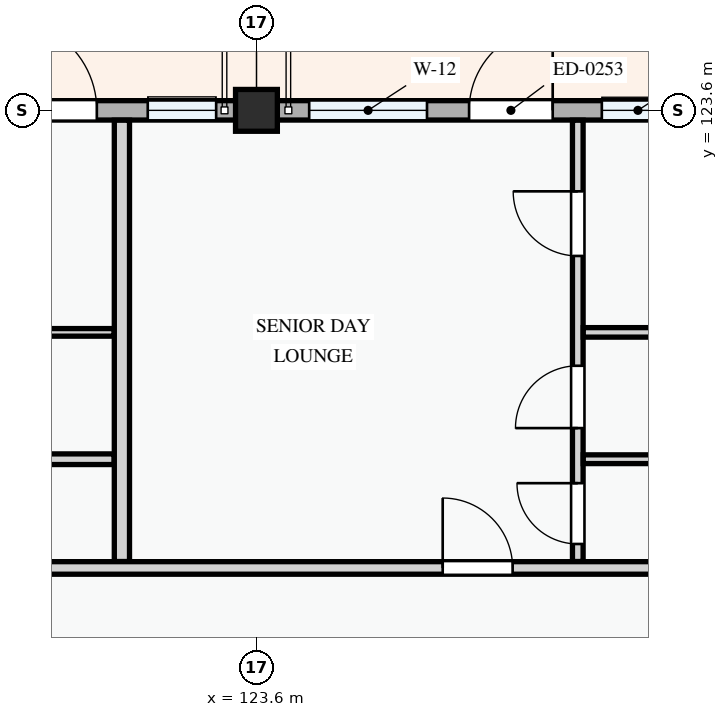
"""IFC4 building model, lengths in metres.
Left out: names, types, materials, properties, quantities, classifications, styles, units other than length and angle.
Written with IfcOpenShell. Run it as: python <this file> out.ifc"""

import sys

from ifc_helpers import new_model, si_unit, direction, frame, frame_2d, origin, origin_2d, place, context, subcontext, project, spatial, rectangle, extrude, element, fill, save


model = new_model("IFC4")
c1 = context("Model", 3, precision=1e-05, world=origin(), true_north=direction((0.0, 1.0)))
c2 = subcontext(c1, "Body", "Model", "MODEL_VIEW")
j1 = project(units=[si_unit("LENGTHUNIT", "METRE"), si_unit("PLANEANGLEUNIT", "RADIAN")], contexts=[c1])
p1 = place(None, origin())
s1 = spatial("IfcSite", under=j1, at=p1, CompositionType="ELEMENT")
p2 = place(p1, origin())
s2 = spatial("IfcBuilding", under=s1, at=p2, CompositionType="ELEMENT")
p3 = place(p2, frame((0.0, 0.0, 34.5)))
s3 = spatial("IfcBuildingStorey", under=s2, at=p3, CompositionType="ELEMENT", Elevation=34.5)
p4 = place(p3, frame((123.6, 123.6, 0.0), z_axis=(0.0, 0.0, 1.0), x_axis=(1.0, 0.0, 0.0)))
e1 = element("IfcColumn", 1, at=p4, inside=s3, PredefinedType="COLUMN", context=c2, shape_type="SweptSolid", body=[
    extrude(rectangle(XDim=0.55, YDim=0.55, at=origin_2d()), origin(), (0.0, 0.0, 1.0), 3.3),
])
p5 = place(p3, frame((129.6, 123.6, 0.0), z_axis=(0.0, 0.0, 1.0), x_axis=(-1.0, 0.0, 0.0)))
e2 = element("IfcWall", 2, at=p5, inside=s3, PredefinedType="STANDARD", context=c2, shape_type="SweptSolid", body=[
    extrude(rectangle(XDim=6.0, YDim=0.255, at=frame_2d((3.0, 0.0))), origin(), (0.0, 0.0, 1.0), 2.445),
])
p6 = place(p5, frame((2.102, 0.0, 0.0)))
e3 = element("IfcOpeningElement", 3, at=p6, cuts=e2, PredefinedType="OPENING", context=c2, shape_type="SweptSolid", body=[
    extrude(rectangle(XDim=1.1, YDim=2.15, at=frame_2d((0.55, 1.075))), frame((0.0, 0.137, 0.0), z_axis=(0.0, -1.0, 0.0), x_axis=(1.0, 0.0, 0.0)), (0.0, 0.0, 1.0), 0.275),
])
p7 = place(p5, frame((0.506, 0.0, 0.78)))
e4 = element("IfcOpeningElement", 4, at=p7, cuts=e2, PredefinedType="OPENING", context=c2, shape_type="SweptSolid", body=[
    extrude(rectangle(XDim=0.95, YDim=1.15, at=frame_2d((0.475, 0.575))), frame((0.0, 0.137, 0.0), z_axis=(0.0, -1.0, 0.0), x_axis=(1.0, 0.0, 0.0)), (0.0, 0.0, 1.0), 0.275),
])
p8 = place(p5, frame((3.756, 0.0, 0.78)))
e5 = element("IfcOpeningElement", 5, at=p8, cuts=e2, PredefinedType="OPENING", context=c2, shape_type="SweptSolid", body=[
    extrude(rectangle(XDim=1.55, YDim=1.4, at=frame_2d((0.775, 0.7))), frame((0.0, 0.137, 0.0), z_axis=(0.0, -1.0, 0.0), x_axis=(1.0, 0.0, 0.0)), (0.0, 0.0, 1.0), 0.275),
])
p9 = place(p3, frame((123.6, 123.6, 0.0), z_axis=(0.0, 0.0, 1.0), x_axis=(-1.0, 0.0, 0.0)))
e6 = element("IfcWall", 6, at=p9, inside=s3, PredefinedType="STANDARD", context=c2, shape_type="SweptSolid", body=[
    extrude(rectangle(XDim=8.4, YDim=0.255, at=frame_2d((4.2, 0.0))), origin(), (0.0, 0.0, 1.0), 2.345),
])
p10 = place(p9, frame((2.1, 0.0, 0.0)))
e7 = element("IfcOpeningElement", 7, at=p10, cuts=e6, PredefinedType="OPENING", context=c2, shape_type="SweptSolid", body=[
    extrude(rectangle(XDim=1.2, YDim=2.15, at=frame_2d((0.6, 1.075))), frame((0.0, 0.137, 0.0), z_axis=(0.0, -1.0, 0.0), x_axis=(1.0, 0.0, 0.0)), (0.0, 0.0, 1.0), 0.275),
])
p11 = place(p9, frame((0.53, 0.0, 0.78)))
e8 = element("IfcOpeningElement", 8, at=p11, cuts=e6, PredefinedType="OPENING", context=c2, shape_type="SweptSolid", body=[
    extrude(rectangle(XDim=0.9, YDim=1.2, at=frame_2d((0.45, 0.6))), frame((0.0, 0.137, 0.0), z_axis=(0.0, -1.0, 0.0), x_axis=(1.0, 0.0, 0.0)), (0.0, 0.0, 1.0), 0.275),
])
p12 = place(p9, frame((4.503, 0.0, 0.78)))
e9 = element("IfcOpeningElement", 9, at=p12, cuts=e6, PredefinedType="OPENING", context=c2, shape_type="SweptSolid", body=[
    extrude(rectangle(XDim=0.95, YDim=1.15, at=frame_2d((0.475, 0.575))), frame((0.0, 0.137, 0.0), z_axis=(0.0, -1.0, 0.0), x_axis=(1.0, 0.0, 0.0)), (0.0, 0.0, 1.0), 0.275),
])
p13 = place(p9, frame((6.908, 0.0, 0.78)))
e10 = element("IfcOpeningElement", 10, at=p13, cuts=e6, PredefinedType="OPENING", context=c2, shape_type="SweptSolid", body=[
    extrude(rectangle(XDim=1.0, YDim=1.25, at=frame_2d((0.5, 0.625))), frame((0.0, 0.137, 0.0), z_axis=(0.0, -1.0, 0.0), x_axis=(1.0, 0.0, 0.0)), (0.0, 0.0, 1.0), 0.275),
])
p14 = place(p3, frame((117.053, 120.679, 0.0), z_axis=(0.0, 0.0, 1.0), x_axis=(1.0, 0.0, 0.0)))
e11 = element("IfcWall", 11, at=p14, inside=s3, PredefinedType="PARTITIONING", context=c2, shape_type="SweptSolid", body=[
    extrude(rectangle(XDim=4.675, YDim=0.1, at=frame_2d((2.337, 0.0))), origin(), (0.0, 0.0, 1.0), 3.0),
])
p15 = place(p3, frame((117.053, 119.01, 0.0), z_axis=(0.0, 0.0, 1.0), x_axis=(1.0, 0.0, 0.0)))
e12 = element("IfcWall", 12, at=p15, inside=s3, PredefinedType="PARTITIONING", context=c2, shape_type="SweptSolid", body=[
    extrude(rectangle(XDim=4.675, YDim=0.14, at=frame_2d((2.337, 0.0))), origin(), (0.0, 0.0, 1.0), 3.0),
])
p16 = place(p3, frame((127.828, 117.665, 0.0), z_axis=(0.0, 0.0, 1.0), x_axis=(0.0, 1.0, 0.0)))
e13 = element("IfcWall", 13, at=p16, inside=s3, PredefinedType="PARTITIONING", context=c2, shape_type="SweptSolid", body=[
    extrude(rectangle(XDim=5.806, YDim=0.14, at=frame_2d((2.903, 0.0))), origin(), (0.0, 0.0, 1.0), 3.0),
])
p17 = place(p16, frame((0.231, 0.0, 0.0)))
e14 = element("IfcOpeningElement", 14, at=p17, cuts=e13, PredefinedType="OPENING", context=c2, shape_type="SweptSolid", body=[
    extrude(rectangle(XDim=0.8, YDim=2.1, at=frame_2d((0.4, 1.05))), frame((0.0, 0.08, 0.0), z_axis=(0.0, -1.0, 0.0), x_axis=(1.0, 0.0, 0.0)), (0.0, 0.0, 1.0), 0.16),
])
p18 = place(p16, frame((1.755, 0.0, 0.0)))
e15 = element("IfcOpeningElement", 15, at=p18, cuts=e13, PredefinedType="OPENING", context=c2, shape_type="SweptSolid", body=[
    extrude(rectangle(XDim=0.82, YDim=2.08, at=frame_2d((0.41, 1.04))), frame((0.0, 0.08, 0.0), z_axis=(0.0, -1.0, 0.0), x_axis=(1.0, 0.0, 0.0)), (0.0, 0.0, 1.0), 0.16),
])
p19 = place(p16, frame((4.02, 0.0, 0.0)))
e16 = element("IfcOpeningElement", 16, at=p19, cuts=e13, PredefinedType="OPENING", context=c2, shape_type="SweptSolid", body=[
    extrude(rectangle(XDim=0.85, YDim=2.1, at=frame_2d((0.425, 1.05))), frame((0.0, 0.08, 0.0), z_axis=(0.0, -1.0, 0.0), x_axis=(1.0, 0.0, 0.0)), (0.0, 0.0, 1.0), 0.16),
])
p20 = place(p3, frame((127.9, 120.679, 0.0), z_axis=(0.0, 0.0, 1.0), x_axis=(1.0, 0.0, 0.0)))
e17 = element("IfcWall", 17, at=p20, inside=s3, PredefinedType="PARTITIONING", context=c2, shape_type="SweptSolid", body=[
    extrude(rectangle(XDim=8.206, YDim=0.125, at=frame_2d((4.103, 0.0))), origin(), (0.0, 0.0, 1.0), 3.0),
])
p21 = place(p3, frame((127.9, 119.01, 0.0), z_axis=(0.0, 0.0, 1.0), x_axis=(1.0, 0.0, 0.0)))
e18 = element("IfcWall", 18, at=p21, inside=s3, PredefinedType="PARTITIONING", context=c2, shape_type="SweptSolid", body=[
    extrude(rectangle(XDim=8.206, YDim=0.115, at=frame_2d((4.103, 0.0))), origin(), (0.0, 0.0, 1.0), 3.0),
])
p22 = place(p3, frame((121.83, 117.665, 0.0), z_axis=(0.0, 0.0, 1.0), x_axis=(0.0, 1.0, 0.0)))
e19 = element("IfcWall", 19, at=p22, inside=s3, PredefinedType="PARTITIONING", context=c2, shape_type="SweptSolid", body=[
    extrude(rectangle(XDim=5.806, YDim=0.2, at=frame_2d((2.903, 0.0))), origin(), (0.0, 0.0, 1.0), 3.0),
])
p23 = place(p3, frame((109.33, 117.58, 0.0), z_axis=(0.0, 0.0, 1.0), x_axis=(1.0, 0.0, 0.0)))
e20 = element("IfcWall", 20, at=p23, inside=s3, PredefinedType="PARTITIONING", context=c2, shape_type="SweptSolid", body=[
    extrude(rectangle(XDim=43.21, YDim=0.165, at=frame_2d((21.605, 0.0))), origin(), (0.0, 0.0, 1.0), 3.0),
])
p24 = place(p23, frame((2.337, 0.0, 0.0)))
e21 = element("IfcOpeningElement", 21, at=p24, cuts=e20, PredefinedType="OPENING", context=c2, shape_type="SweptSolid", body=[
    extrude(rectangle(XDim=0.92, YDim=2.1, at=frame_2d((0.46, 1.05))), frame((0.0, 0.093, 0.0), z_axis=(0.0, -1.0, 0.0), x_axis=(1.0, 0.0, 0.0)), (0.0, 0.0, 1.0), 0.185),
])
p25 = place(p23, frame((16.721, 0.0, 0.0)))
e22 = element("IfcOpeningElement", 22, at=p25, cuts=e20, PredefinedType="OPENING", context=c2, shape_type="SweptSolid", body=[
    extrude(rectangle(XDim=0.92, YDim=2.1, at=frame_2d((0.46, 1.05))), frame((0.0, 0.093, 0.0), z_axis=(0.0, -1.0, 0.0), x_axis=(1.0, 0.0, 0.0)), (0.0, 0.0, 1.0), 0.185),
])
p26 = place(p23, frame((31.135, 0.0, 0.0)))
e23 = element("IfcOpeningElement", 23, at=p26, cuts=e20, PredefinedType="OPENING", context=c2, shape_type="SweptSolid", body=[
    extrude(rectangle(XDim=0.92, YDim=2.1, at=frame_2d((0.46, 1.05))), frame((0.0, 0.093, 0.0), z_axis=(0.0, -1.0, 0.0), x_axis=(1.0, 0.0, 0.0)), (0.0, 0.0, 1.0), 0.185),
])
p27 = place(p6, frame((1.1, 0.0, 0.0), z_axis=(0.0, 0.0, 1.0), x_axis=(-1.0, 0.0, 0.0)))
e24 = element("IfcDoor", 24, at=p27, inside=s3, OperationType="SINGLE_SWING_RIGHT", PredefinedType="DOOR", context=c2, shape_type="SweptSolid", body=[
    extrude(rectangle(XDim=1.1, YDim=2.15, at=frame_2d((0.55, 1.075))), frame((0.0, 0.025, 0.0), z_axis=(0.0, -1.0, 0.0), x_axis=(1.0, 0.0, 0.0)), (0.0, 0.0, 1.0), 0.05),
])
fill(e3, e24)
p28 = place(p7, origin())
e25 = element("IfcWindow", 25, at=p28, inside=s3, PartitioningType="SINGLE_PANEL", PredefinedType="WINDOW", context=c2, shape_type="SweptSolid", body=[
    extrude(rectangle(XDim=0.95, YDim=1.15, at=frame_2d((0.475, 0.575))), frame((0.0, 0.03, 0.0), z_axis=(0.0, -1.0, 0.0), x_axis=(1.0, 0.0, 0.0)), (0.0, 0.0, 1.0), 0.06),
])
fill(e4, e25)
p29 = place(p8, origin())
e26 = element("IfcWindow", 26, at=p29, inside=s3, PartitioningType="SINGLE_PANEL", PredefinedType="WINDOW", context=c2, shape_type="SweptSolid", body=[
    extrude(rectangle(XDim=1.55, YDim=1.4, at=frame_2d((0.775, 0.7))), frame((0.0, 0.03, 0.0), z_axis=(0.0, -1.0, 0.0), x_axis=(1.0, 0.0, 0.0)), (0.0, 0.0, 1.0), 0.06),
])
fill(e5, e26)
p30 = place(p10, frame((1.2, 0.0, 0.0), z_axis=(0.0, 0.0, 1.0), x_axis=(-1.0, 0.0, 0.0)))
e27 = element("IfcDoor", 27, at=p30, inside=s3, OperationType="SINGLE_SWING_LEFT", PredefinedType="DOOR", context=c2, shape_type="SweptSolid", body=[
    extrude(rectangle(XDim=1.2, YDim=2.15, at=frame_2d((0.6, 1.075))), frame((0.0, 0.025, 0.0), z_axis=(0.0, -1.0, 0.0), x_axis=(1.0, 0.0, 0.0)), (0.0, 0.0, 1.0), 0.05),
])
fill(e7, e27)
p31 = place(p11, origin())
e28 = element("IfcWindow", 28, at=p31, inside=s3, PartitioningType="SINGLE_PANEL", PredefinedType="WINDOW", context=c2, shape_type="SweptSolid", body=[
    extrude(rectangle(XDim=0.9, YDim=1.2, at=frame_2d((0.45, 0.6))), frame((0.0, 0.03, 0.0), z_axis=(0.0, -1.0, 0.0), x_axis=(1.0, 0.0, 0.0)), (0.0, 0.0, 1.0), 0.06),
])
fill(e8, e28)
p32 = place(p17, origin())
e29 = element("IfcDoor", 29, at=p32, inside=s3, OperationType="SINGLE_SWING_RIGHT", PredefinedType="DOOR", context=c2, shape_type="SweptSolid", body=[
    extrude(rectangle(XDim=0.8, YDim=2.1, at=frame_2d((0.4, 1.05))), frame((0.0, 0.025, 0.0), z_axis=(0.0, -1.0, 0.0), x_axis=(1.0, 0.0, 0.0)), (0.0, 0.0, 1.0), 0.05),
])
fill(e14, e29)
p33 = place(p18, origin())
e30 = element("IfcDoor", 30, at=p33, inside=s3, OperationType="SINGLE_SWING_LEFT", PredefinedType="DOOR", context=c2, shape_type="SweptSolid", body=[
    extrude(rectangle(XDim=0.82, YDim=2.08, at=frame_2d((0.41, 1.04))), frame((0.0, 0.025, 0.0), z_axis=(0.0, -1.0, 0.0), x_axis=(1.0, 0.0, 0.0)), (0.0, 0.0, 1.0), 0.05),
])
fill(e15, e30)
p34 = place(p19, origin())
e31 = element("IfcDoor", 31, at=p34, inside=s3, OperationType="SINGLE_SWING_RIGHT", PredefinedType="DOOR", context=c2, shape_type="SweptSolid", body=[
    extrude(rectangle(XDim=0.85, YDim=2.1, at=frame_2d((0.425, 1.05))), frame((0.0, 0.025, 0.0), z_axis=(0.0, -1.0, 0.0), x_axis=(1.0, 0.0, 0.0)), (0.0, 0.0, 1.0), 0.05),
])
fill(e16, e31)
p35 = place(p25, origin())
e32 = element("IfcDoor", 32, at=p35, inside=s3, OperationType="SINGLE_SWING_LEFT", PredefinedType="DOOR", context=c2, shape_type="SweptSolid", body=[
    extrude(rectangle(XDim=0.92, YDim=2.1, at=frame_2d((0.46, 1.05))), frame((0.0, 0.025, 0.0), z_axis=(0.0, -1.0, 0.0), x_axis=(1.0, 0.0, 0.0)), (0.0, 0.0, 1.0), 0.05),
])
fill(e22, e32)
save(model, sys.argv[1])
